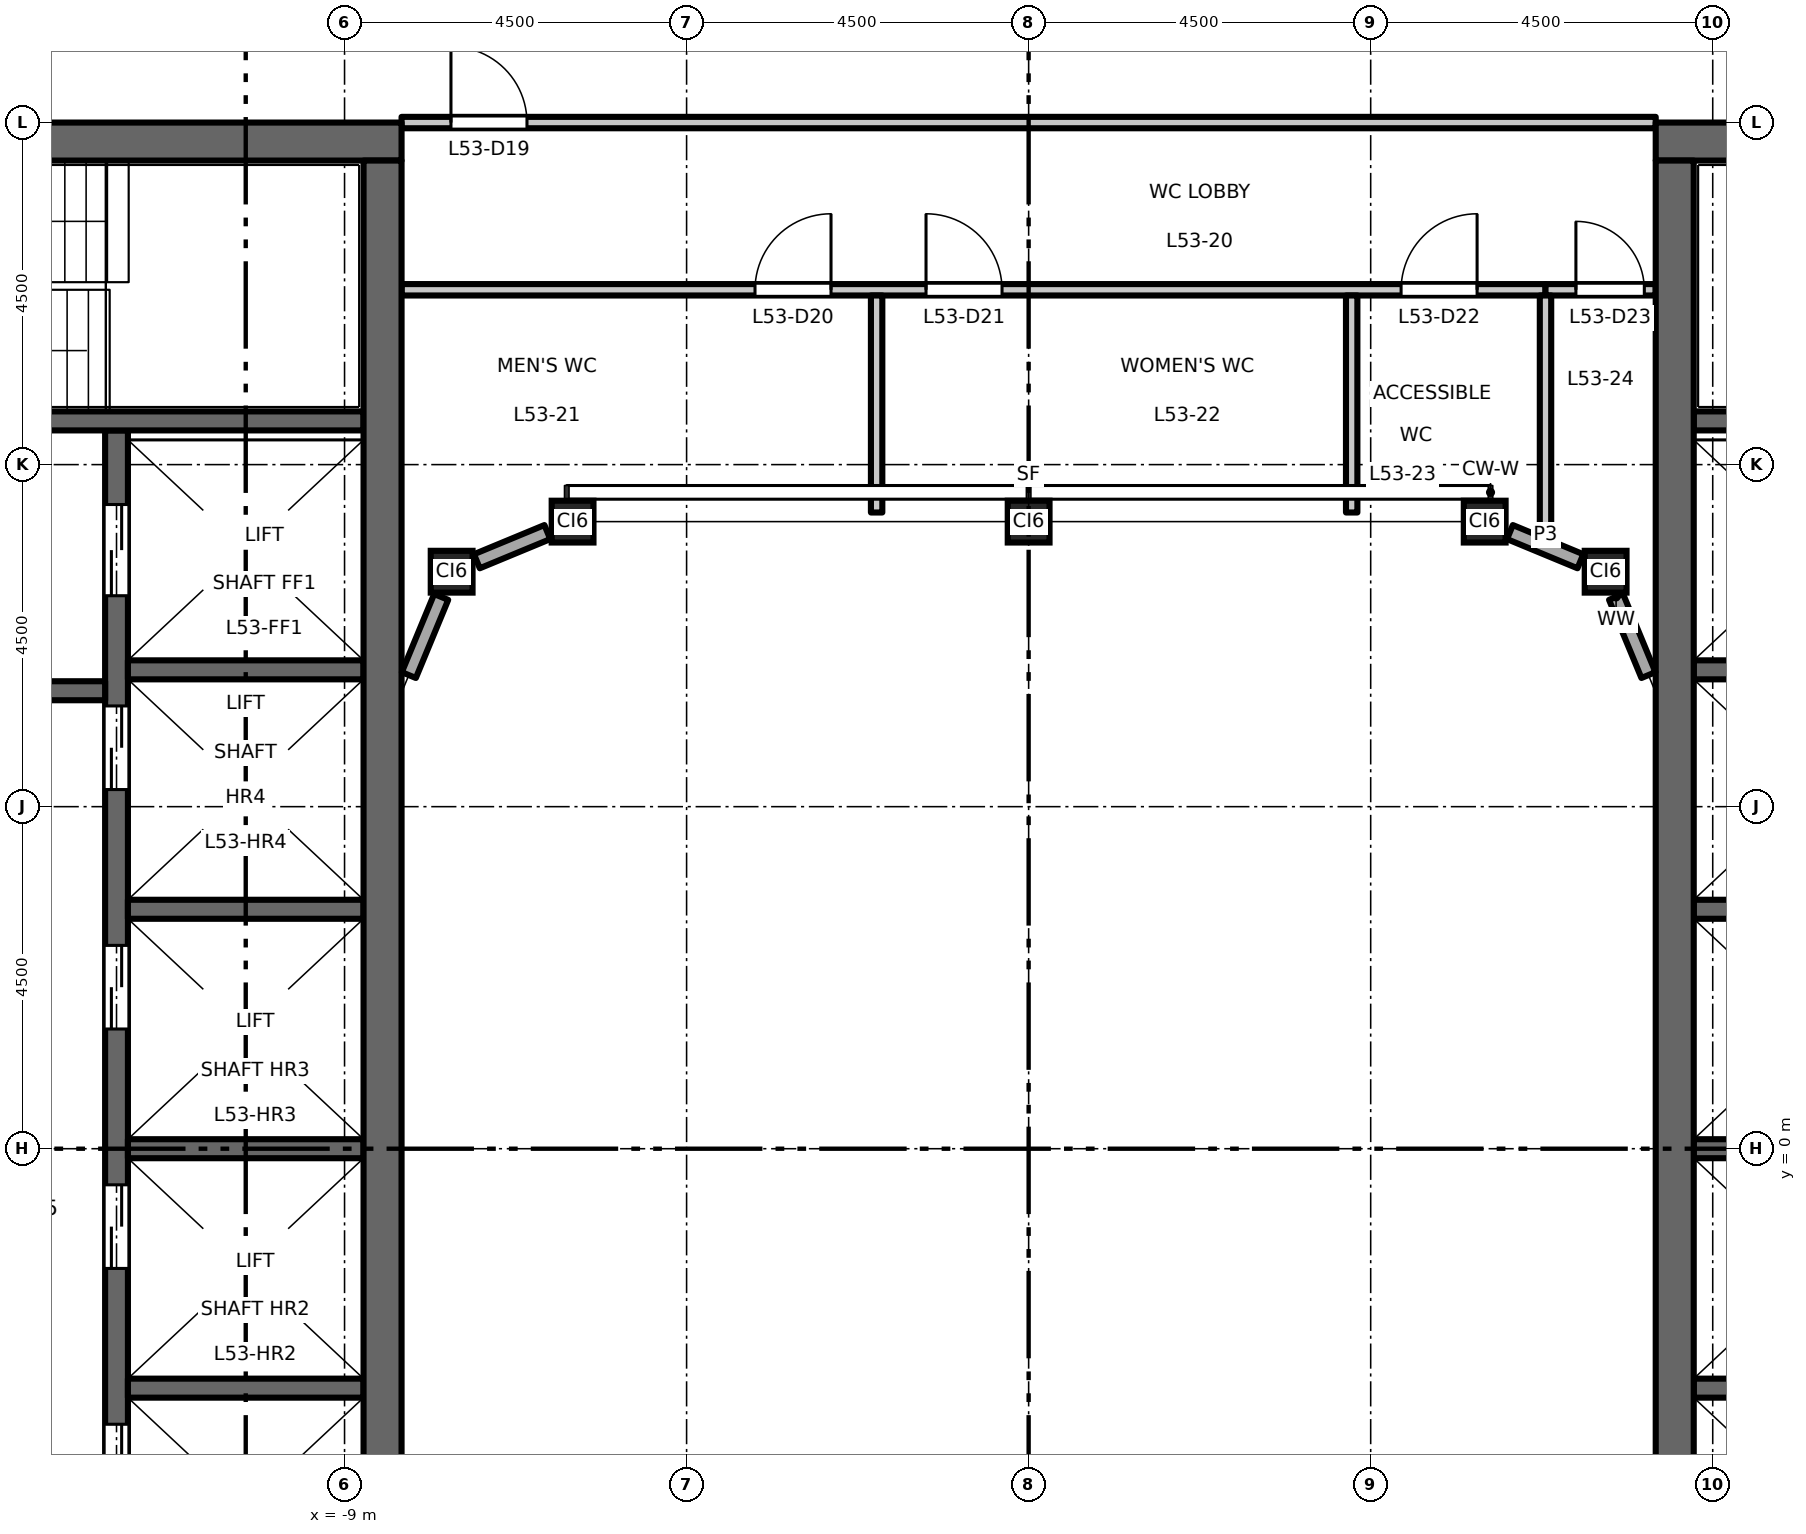
"""IFC4 building model, lengths in metres.
Left out: names, types, materials, properties, quantities, classifications, styles, units other than length and angle.
Written with IfcOpenShell. Run it as: python <this file> out.ifc"""

import sys

from ifc_helpers import new_model, si_unit, direction, frame, frame_2d, origin, origin_2d, place, context, subcontext, project, spatial, rectangle, hollow_rectangle, extrude, element, fill, save


model = new_model("IFC4")
c1 = context("Model", 3, precision=1e-05, world=origin(), true_north=direction((0.0, 1.0)))
c2 = subcontext(c1, "Body", "Model", "MODEL_VIEW")
j1 = project(units=[si_unit("LENGTHUNIT", "METRE"), si_unit("PLANEANGLEUNIT", "RADIAN")], contexts=[c1])
p1 = place(None, origin())
s1 = spatial("IfcSite", under=j1, at=p1, CompositionType="ELEMENT")
p2 = place(p1, origin())
s2 = spatial("IfcBuilding", under=s1, at=p2, CompositionType="ELEMENT")
p3 = place(p2, frame((0.0, 0.0, 246.7)))
s3 = spatial("IfcBuildingStorey", under=s2, at=p3, CompositionType="ELEMENT", Elevation=246.7)
for number, where, z_axis, x_axis in (
    (1, (-7.591, 7.591, 0.0), (0.0, 0.0, 1.0), (1.0, 0.0, 0.0)),
    (2, (-6.0, 8.25, 0.0), (0.0, 0.0, 1.0), (1.0, 0.0, 0.0)),
    (3, (0.0, 8.25, 0.0), (0.0, 0.0, 1.0), (1.0, 0.0, 0.0)),
    (4, (6.0, 8.25, 0.0), (0.0, 0.0, 1.0), (1.0, 0.0, 0.0)),
    (5, (7.591, 7.591, 0.0), (0.0, 0.0, 1.0), (1.0, 0.0, 0.0)),
):
    element("IfcColumn", number, at=place(p3, frame(where, z_axis=z_axis, x_axis=x_axis)), inside=s3, PredefinedType="COLUMN", context=c2, shape_type="SweptSolid", body=[
        extrude(hollow_rectangle(XDim=0.55, YDim=0.55, WallThickness=0.028, at=origin_2d()), origin(), (0.0, 0.0, 1.0), 4.5),
    ])
p4 = place(p3, frame((-12.0, -9.45, 0.0), z_axis=(0.0, 0.0, 1.0), x_axis=(0.0, 1.0, 0.0)))
e6 = element("IfcWall", 6, at=p4, inside=s3, PredefinedType="SHEAR", context=c2, shape_type="SweptSolid", body=[
    extrude(rectangle(XDim=18.9, YDim=0.3, at=frame_2d((9.45, 0.0))), origin(), (0.0, 0.0, 1.0), 4.35),
])
p5 = place(p4, frame((4.725, 0.0, 0.0)))
e7 = element("IfcOpeningElement", 7, at=p5, cuts=e6, PredefinedType="OPENING", context=c2, shape_type="SweptSolid", body=[
    extrude(rectangle(XDim=1.1, YDim=2.1, at=frame_2d((0.55, 1.05))), frame((0.0, 0.16, 0.0), z_axis=(0.0, -1.0, 0.0), x_axis=(1.0, 0.0, 0.0)), (0.0, 0.0, 1.0), 0.32),
])
p6 = place(p4, frame((7.875, 0.0, 0.0)))
e8 = element("IfcOpeningElement", 8, at=p6, cuts=e6, PredefinedType="OPENING", context=c2, shape_type="SweptSolid", body=[
    extrude(rectangle(XDim=1.1, YDim=2.1, at=frame_2d((0.55, 1.05))), frame((0.0, 0.16, 0.0), z_axis=(0.0, -1.0, 0.0), x_axis=(1.0, 0.0, 0.0)), (0.0, 0.0, 1.0), 0.32),
])
p7 = place(p4, frame((11.025, 0.0, 0.0)))
e9 = element("IfcOpeningElement", 9, at=p7, cuts=e6, PredefinedType="OPENING", context=c2, shape_type="SweptSolid", body=[
    extrude(rectangle(XDim=1.1, YDim=2.1, at=frame_2d((0.55, 1.05))), frame((0.0, 0.16, 0.0), z_axis=(0.0, -1.0, 0.0), x_axis=(1.0, 0.0, 0.0)), (0.0, 0.0, 1.0), 0.32),
])
p8 = place(p4, frame((14.175, 0.0, 0.0)))
e10 = element("IfcOpeningElement", 10, at=p8, cuts=e6, PredefinedType="OPENING", context=c2, shape_type="SweptSolid", body=[
    extrude(rectangle(XDim=1.1, YDim=2.1, at=frame_2d((0.55, 1.05))), frame((0.0, 0.16, 0.0), z_axis=(0.0, -1.0, 0.0), x_axis=(1.0, 0.0, 0.0)), (0.0, 0.0, 1.0), 0.32),
])
p9 = place(p4, frame((16.725, 0.0, 0.0)))
e11 = element("IfcOpeningElement", 11, at=p9, cuts=e6, PredefinedType="OPENING", context=c2, shape_type="SweptSolid", body=[
    extrude(rectangle(XDim=1.2, YDim=2.1, at=frame_2d((0.6, 1.05))), frame((0.0, 0.16, 0.0), z_axis=(0.0, -1.0, 0.0), x_axis=(1.0, 0.0, 0.0)), (0.0, 0.0, 1.0), 0.32),
])
p10 = place(p4, frame((0.975, 0.0, 0.0)))
e12 = element("IfcOpeningElement", 12, at=p10, cuts=e6, PredefinedType="OPENING", context=c2, shape_type="SweptSolid", body=[
    extrude(rectangle(XDim=1.2, YDim=2.1, at=frame_2d((0.6, 1.05))), frame((0.0, 0.16, 0.0), z_axis=(0.0, -1.0, 0.0), x_axis=(1.0, 0.0, 0.0)), (0.0, 0.0, 1.0), 0.32),
])
p11 = place(p3, frame((-12.15, 6.025, 0.0), z_axis=(0.0, 0.0, 1.0), x_axis=(-1.0, 0.0, 0.0)))
e13 = element("IfcWall", 13, at=p11, inside=s3, PredefinedType="SHEAR", context=c2, shape_type="SweptSolid", body=[
    extrude(rectangle(XDim=4.6, YDim=0.25, at=frame_2d((2.3, 0.0))), origin(), (0.0, 0.0, 1.0), 4.35),
])
p12 = place(p11, frame((1.8, 0.0, 0.0)))
e14 = element("IfcOpeningElement", 14, at=p12, cuts=e13, PredefinedType="OPENING", context=c2, shape_type="SweptSolid", body=[
    extrude(rectangle(XDim=1.0, YDim=2.1, at=frame_2d((0.5, 1.05))), frame((0.0, 0.135, 0.0), z_axis=(0.0, -1.0, 0.0), x_axis=(1.0, 0.0, 0.0)), (0.0, 0.0, 1.0), 0.27),
])
for number, where, z_axis, x_axis in (
    (15, (-8.75, 0.0, 0.0), (0.0, 0.0, 1.0), (-1.0, 0.0, 0.0)),
    (16, (-8.75, 3.15, 0.0), (0.0, 0.0, 1.0), (-1.0, 0.0, 0.0)),
    (17, (-8.75, 6.3, 0.0), (0.0, 0.0, 1.0), (-1.0, 0.0, 0.0)),
    (18, (-8.75, -3.15, 0.0), (0.0, 0.0, 1.0), (-1.0, 0.0, 0.0)),
):
    element("IfcWall", number, at=place(p3, frame(where, z_axis=z_axis, x_axis=x_axis)), inside=s3, PredefinedType="SHEAR", context=c2, shape_type="SweptSolid", body=[
        extrude(rectangle(XDim=3.1, YDim=0.25, at=frame_2d((1.55, 0.0))), origin(), (0.0, 0.0, 1.0), 4.35),
    ])
p13 = place(p3, frame((-8.75, 9.575, 0.0), z_axis=(0.0, 0.0, 1.0), x_axis=(-1.0, 0.0, 0.0)))
e19 = element("IfcWall", 19, at=p13, inside=s3, PredefinedType="SHEAR", context=c2, shape_type="SweptSolid", body=[
    extrude(rectangle(XDim=8.0, YDim=0.25, at=frame_2d((4.0, 0.0))), origin(), (0.0, 0.0, 1.0), 4.35),
])
p14 = place(p13, frame((6.65, 0.0, 0.0)))
e20 = element("IfcOpeningElement", 20, at=p14, cuts=e19, PredefinedType="OPENING", context=c2, shape_type="SweptSolid", body=[
    extrude(rectangle(XDim=1.1, YDim=2.1, at=frame_2d((0.55, 1.05))), frame((0.0, 0.135, 0.0), z_axis=(0.0, -1.0, 0.0), x_axis=(1.0, 0.0, 0.0)), (0.0, 0.0, 1.0), 0.27),
])
p15 = place(p3, frame((-8.25, 13.25, 0.0), z_axis=(0.0, 0.0, 1.0), x_axis=(-1.0, 0.0, 0.0)))
e21 = element("IfcWall", 21, at=p15, inside=s3, PredefinedType="SHEAR", context=c2, shape_type="SweptSolid", body=[
    extrude(rectangle(XDim=13.5, YDim=0.5, at=frame_2d((6.75, 0.0))), origin(), (0.0, 0.0, 1.0), 4.35),
])
p16 = place(p3, frame((-8.5, -13.0, 0.0), z_axis=(0.0, 0.0, 1.0), x_axis=(0.0, 1.0, 0.0)))
e22 = element("IfcWall", 22, at=p16, inside=s3, PredefinedType="SHEAR", context=c2, shape_type="SweptSolid", body=[
    extrude(rectangle(XDim=26.0, YDim=0.5, at=frame_2d((13.0, 0.0))), origin(), (0.0, 0.0, 1.0), 4.35),
])
for number, where, z_axis, x_axis in (
    (23, (8.75, 0.0, 0.0), (0.0, 0.0, 1.0), (1.0, 0.0, 0.0)),
    (24, (8.75, 3.15, 0.0), (0.0, 0.0, 1.0), (1.0, 0.0, 0.0)),
    (25, (8.75, 6.3, 0.0), (0.0, 0.0, 1.0), (1.0, 0.0, 0.0)),
    (26, (8.75, -3.15, 0.0), (0.0, 0.0, 1.0), (1.0, 0.0, 0.0)),
):
    element("IfcWall", number, at=place(p3, frame(where, z_axis=z_axis, x_axis=x_axis)), inside=s3, PredefinedType="SHEAR", context=c2, shape_type="SweptSolid", body=[
        extrude(rectangle(XDim=3.1, YDim=0.25, at=frame_2d((1.55, 0.0))), origin(), (0.0, 0.0, 1.0), 4.35),
    ])
p17 = place(p3, frame((8.75, 9.575, 0.0), z_axis=(0.0, 0.0, 1.0), x_axis=(1.0, 0.0, 0.0)))
e27 = element("IfcWall", 27, at=p17, inside=s3, PredefinedType="SHEAR", context=c2, shape_type="SweptSolid", body=[
    extrude(rectangle(XDim=8.0, YDim=0.25, at=frame_2d((4.0, 0.0))), origin(), (0.0, 0.0, 1.0), 4.35),
])
p18 = place(p17, frame((6.65, 0.0, 0.0)))
e28 = element("IfcOpeningElement", 28, at=p18, cuts=e27, PredefinedType="OPENING", context=c2, shape_type="SweptSolid", body=[
    extrude(rectangle(XDim=1.1, YDim=2.1, at=frame_2d((0.55, 1.05))), frame((0.0, 0.135, 0.0), z_axis=(0.0, -1.0, 0.0), x_axis=(1.0, 0.0, 0.0)), (0.0, 0.0, 1.0), 0.27),
])
p19 = place(p3, frame((8.25, 13.25, 0.0), z_axis=(0.0, 0.0, 1.0), x_axis=(1.0, 0.0, 0.0)))
e29 = element("IfcWall", 29, at=p19, inside=s3, PredefinedType="SHEAR", context=c2, shape_type="SweptSolid", body=[
    extrude(rectangle(XDim=13.5, YDim=0.5, at=frame_2d((6.75, 0.0))), origin(), (0.0, 0.0, 1.0), 4.35),
])
p20 = place(p3, frame((8.5, -13.0, 0.0), z_axis=(0.0, 0.0, 1.0), x_axis=(0.0, 1.0, 0.0)))
e30 = element("IfcWall", 30, at=p20, inside=s3, PredefinedType="SHEAR", context=c2, shape_type="SweptSolid", body=[
    extrude(rectangle(XDim=26.0, YDim=0.5, at=frame_2d((13.0, 0.0))), origin(), (0.0, 0.0, 1.0), 4.35),
])
p21 = place(p3, frame((8.154, 6.231, 0.0), z_axis=(0.0, 0.0, 1.0), x_axis=(-0.382635994082, 0.923899180665, 0.0)))
e31 = element("IfcWall", 31, at=p21, inside=s3, PredefinedType="STANDARD", context=c2, shape_type="SweptSolid", body=[
    extrude(rectangle(XDim=1.113, YDim=0.2, at=frame_2d((0.556, 0.0))), origin(), (0.0, 0.0, 1.0), 3.918),
])
for number, where, z_axis, x_axis in (
    (32, (7.259, 7.729, 0.0), (0.0, 0.0, 1.0), (-0.924, 0.383, 0.0)),
    (33, (-6.332, 8.113, 0.0), (0.0, 0.0, 1.0), (-0.924, -0.383, 0.0)),
):
    element("IfcWall", number, at=place(p3, frame(where, z_axis=z_axis, x_axis=x_axis)), inside=s3, PredefinedType="STANDARD", context=c2, shape_type="SweptSolid", body=[
        extrude(rectangle(XDim=1.003, YDim=0.2, at=frame_2d((0.502, 0.0))), origin(), (0.0, 0.0, 1.0), 3.918),
    ])
p22 = place(p3, frame((-7.729, 7.259, 0.0), z_axis=(0.0, 0.0, 1.0), x_axis=(-0.382635994082, -0.923899180665, 0.0)))
e34 = element("IfcWall", 34, at=p22, inside=s3, PredefinedType="STANDARD", context=c2, shape_type="SweptSolid", body=[
    extrude(rectangle(XDim=1.113, YDim=0.2, at=frame_2d((0.556, 0.0))), origin(), (0.0, 0.0, 1.0), 3.918),
])
p23 = place(p3, frame((-8.25, 11.3, 0.0), z_axis=(0.0, 0.0, 1.0), x_axis=(1.0, 0.0, 0.0)))
e35 = element("IfcWall", 35, at=p23, inside=s3, PredefinedType="PARTITIONING", context=c2, shape_type="SweptSolid", body=[
    extrude(rectangle(XDim=15.05, YDim=0.15, at=frame_2d((7.525, 0.0))), origin(), (0.0, 0.0, 1.0), 4.35),
])
p24 = place(p23, frame((4.65, 0.0, 0.0)))
e36 = element("IfcOpeningElement", 36, at=p24, cuts=e35, PredefinedType="OPENING", context=c2, shape_type="SweptSolid", body=[
    extrude(rectangle(XDim=1.0, YDim=2.1, at=frame_2d((0.5, 1.05))), frame((0.0, 0.085, 0.0), z_axis=(0.0, -1.0, 0.0), x_axis=(1.0, 0.0, 0.0)), (0.0, 0.0, 1.0), 0.17),
])
p25 = place(p23, frame((6.9, 0.0, 0.0)))
e37 = element("IfcOpeningElement", 37, at=p25, cuts=e35, PredefinedType="OPENING", context=c2, shape_type="SweptSolid", body=[
    extrude(rectangle(XDim=1.0, YDim=2.1, at=frame_2d((0.5, 1.05))), frame((0.0, 0.085, 0.0), z_axis=(0.0, -1.0, 0.0), x_axis=(1.0, 0.0, 0.0)), (0.0, 0.0, 1.0), 0.17),
])
p26 = place(p23, frame((13.15, 0.0, 0.0)))
e38 = element("IfcOpeningElement", 38, at=p26, cuts=e35, PredefinedType="OPENING", context=c2, shape_type="SweptSolid", body=[
    extrude(rectangle(XDim=1.0, YDim=2.1, at=frame_2d((0.5, 1.05))), frame((0.0, 0.085, 0.0), z_axis=(0.0, -1.0, 0.0), x_axis=(1.0, 0.0, 0.0)), (0.0, 0.0, 1.0), 0.17),
])
p27 = place(p3, frame((6.8, 11.3, 0.0), z_axis=(0.0, 0.0, 1.0), x_axis=(1.0, 0.0, 0.0)))
e39 = element("IfcWall", 39, at=p27, inside=s3, PredefinedType="PARTITIONING", context=c2, shape_type="SweptSolid", body=[
    extrude(rectangle(XDim=1.45, YDim=0.15, at=frame_2d((0.725, 0.0))), origin(), (0.0, 0.0, 1.0), 4.35),
])
p28 = place(p27, frame((0.4, 0.0, 0.0)))
e40 = element("IfcOpeningElement", 40, at=p28, cuts=e39, PredefinedType="OPENING", context=c2, shape_type="SweptSolid", body=[
    extrude(rectangle(XDim=0.9, YDim=2.1, at=frame_2d((0.45, 1.05))), frame((0.0, 0.085, 0.0), z_axis=(0.0, -1.0, 0.0), x_axis=(1.0, 0.0, 0.0)), (0.0, 0.0, 1.0), 0.17),
])
p29 = place(p3, frame((-8.25, 13.5, 0.0), z_axis=(0.0, 0.0, 1.0), x_axis=(1.0, 0.0, 0.0)))
e41 = element("IfcWall", 41, at=p29, inside=s3, PredefinedType="PARTITIONING", context=c2, shape_type="SweptSolid", body=[
    extrude(rectangle(XDim=16.5, YDim=0.15, at=frame_2d((8.25, 0.0))), origin(), (0.0, 0.0, 1.0), 4.35),
])
p30 = place(p29, frame((0.65, 0.0, 0.0)))
e42 = element("IfcOpeningElement", 42, at=p30, cuts=e41, PredefinedType="OPENING", context=c2, shape_type="SweptSolid", body=[
    extrude(rectangle(XDim=1.0, YDim=2.1, at=frame_2d((0.5, 1.05))), frame((0.0, 0.085, 0.0), z_axis=(0.0, -1.0, 0.0), x_axis=(1.0, 0.0, 0.0)), (0.0, 0.0, 1.0), 0.17),
])
for number, where, z_axis, x_axis in (
    (43, (-2.0, 8.37, 0.0), (0.0, 0.0, 1.0), (0.0, 1.0, 0.0)),
    (44, (4.25, 8.37, 0.0), (0.0, 0.0, 1.0), (0.0, 1.0, 0.0)),
):
    element("IfcWall", number, at=place(p3, frame(where, z_axis=z_axis, x_axis=x_axis)), inside=s3, PredefinedType="PARTITIONING", context=c2, shape_type="SweptSolid", body=[
        extrude(rectangle(XDim=2.855, YDim=0.15, at=frame_2d((1.427, 0.0))), origin(), (0.0, 0.0, 1.0), 4.35),
    ])
p31 = place(p3, frame((6.8, 8.069, 0.0), z_axis=(0.0, 0.0, 1.0), x_axis=(0.0, 1.0, 0.0)))
e45 = element("IfcWall", 45, at=p31, inside=s3, PredefinedType="PARTITIONING", context=c2, shape_type="SweptSolid", body=[
    extrude(rectangle(XDim=3.156, YDim=0.15, at=frame_2d((1.578, 0.0))), origin(), (0.0, 0.0, 1.0), 4.35),
])
p32 = place(p5, origin())
e46 = element("IfcDoor", 46, at=p32, inside=s3, OperationType="DOUBLE_DOOR_SLIDING", PredefinedType="DOOR", context=c2, shape_type="SweptSolid", body=[
    extrude(rectangle(XDim=1.1, YDim=2.1, at=frame_2d((0.55, 1.05))), frame((0.0, 0.025, 0.0), z_axis=(0.0, -1.0, 0.0), x_axis=(1.0, 0.0, 0.0)), (0.0, 0.0, 1.0), 0.05),
])
fill(e7, e46)
p33 = place(p6, origin())
e47 = element("IfcDoor", 47, at=p33, inside=s3, OperationType="DOUBLE_DOOR_SLIDING", PredefinedType="DOOR", context=c2, shape_type="SweptSolid", body=[
    extrude(rectangle(XDim=1.1, YDim=2.1, at=frame_2d((0.55, 1.05))), frame((0.0, 0.025, 0.0), z_axis=(0.0, -1.0, 0.0), x_axis=(1.0, 0.0, 0.0)), (0.0, 0.0, 1.0), 0.05),
])
fill(e8, e47)
p34 = place(p7, origin())
e48 = element("IfcDoor", 48, at=p34, inside=s3, OperationType="DOUBLE_DOOR_SLIDING", PredefinedType="DOOR", context=c2, shape_type="SweptSolid", body=[
    extrude(rectangle(XDim=1.1, YDim=2.1, at=frame_2d((0.55, 1.05))), frame((0.0, 0.025, 0.0), z_axis=(0.0, -1.0, 0.0), x_axis=(1.0, 0.0, 0.0)), (0.0, 0.0, 1.0), 0.05),
])
fill(e9, e48)
p35 = place(p8, origin())
e49 = element("IfcDoor", 49, at=p35, inside=s3, OperationType="DOUBLE_DOOR_SLIDING", PredefinedType="DOOR", context=c2, shape_type="SweptSolid", body=[
    extrude(rectangle(XDim=1.1, YDim=2.1, at=frame_2d((0.55, 1.05))), frame((0.0, 0.025, 0.0), z_axis=(0.0, -1.0, 0.0), x_axis=(1.0, 0.0, 0.0)), (0.0, 0.0, 1.0), 0.05),
])
fill(e10, e49)
p36 = place(p9, origin())
e50 = element("IfcDoor", 50, at=p36, inside=s3, OperationType="DOUBLE_DOOR_SLIDING", PredefinedType="DOOR", context=c2, shape_type="SweptSolid", body=[
    extrude(rectangle(XDim=1.2, YDim=2.1, at=frame_2d((0.6, 1.05))), frame((0.0, 0.025, 0.0), z_axis=(0.0, -1.0, 0.0), x_axis=(1.0, 0.0, 0.0)), (0.0, 0.0, 1.0), 0.05),
])
fill(e11, e50)
p37 = place(p30, origin())
e51 = element("IfcDoor", 51, at=p37, inside=s3, OperationType="SINGLE_SWING_LEFT", PredefinedType="DOOR", context=c2, shape_type="SweptSolid", body=[
    extrude(rectangle(XDim=1.0, YDim=2.1, at=frame_2d((0.5, 1.05))), frame((0.0, 0.025, 0.0), z_axis=(0.0, -1.0, 0.0), x_axis=(1.0, 0.0, 0.0)), (0.0, 0.0, 1.0), 0.05),
])
fill(e42, e51)
p38 = place(p24, origin())
e52 = element("IfcDoor", 52, at=p38, inside=s3, OperationType="SINGLE_SWING_RIGHT", PredefinedType="DOOR", context=c2, shape_type="SweptSolid", body=[
    extrude(rectangle(XDim=1.0, YDim=2.1, at=frame_2d((0.5, 1.05))), frame((0.0, 0.025, 0.0), z_axis=(0.0, -1.0, 0.0), x_axis=(1.0, 0.0, 0.0)), (0.0, 0.0, 1.0), 0.05),
])
fill(e36, e52)
p39 = place(p25, origin())
e53 = element("IfcDoor", 53, at=p39, inside=s3, OperationType="SINGLE_SWING_LEFT", PredefinedType="DOOR", context=c2, shape_type="SweptSolid", body=[
    extrude(rectangle(XDim=1.0, YDim=2.1, at=frame_2d((0.5, 1.05))), frame((0.0, 0.025, 0.0), z_axis=(0.0, -1.0, 0.0), x_axis=(1.0, 0.0, 0.0)), (0.0, 0.0, 1.0), 0.05),
])
fill(e37, e53)
p40 = place(p26, origin())
e54 = element("IfcDoor", 54, at=p40, inside=s3, OperationType="SINGLE_SWING_RIGHT", PredefinedType="DOOR", context=c2, shape_type="SweptSolid", body=[
    extrude(rectangle(XDim=1.0, YDim=2.1, at=frame_2d((0.5, 1.05))), frame((0.0, 0.025, 0.0), z_axis=(0.0, -1.0, 0.0), x_axis=(1.0, 0.0, 0.0)), (0.0, 0.0, 1.0), 0.05),
])
fill(e38, e54)
p41 = place(p28, origin())
e55 = element("IfcDoor", 55, at=p41, inside=s3, OperationType="SINGLE_SWING_LEFT", PredefinedType="DOOR", context=c2, shape_type="SweptSolid", body=[
    extrude(rectangle(XDim=0.9, YDim=2.1, at=frame_2d((0.45, 1.05))), frame((0.0, 0.025, 0.0), z_axis=(0.0, -1.0, 0.0), x_axis=(1.0, 0.0, 0.0)), (0.0, 0.0, 1.0), 0.05),
])
fill(e40, e55)
save(model, sys.argv[1])
